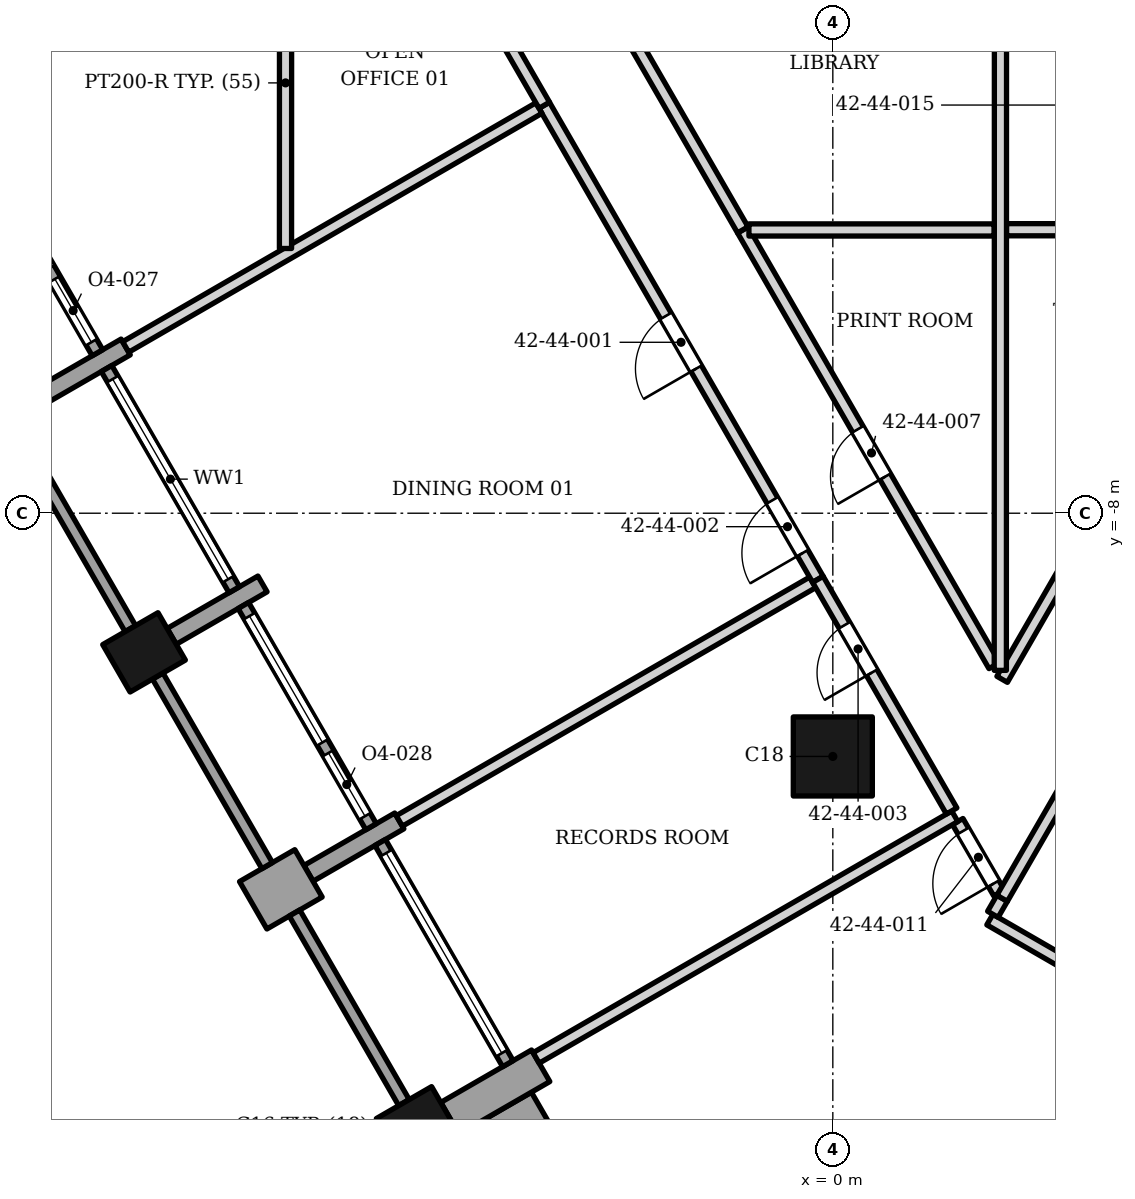
"""IFC4 building model, lengths in metres.
Left out: names, types, materials, properties, quantities, classifications, styles, units other than length and angle.
Written with IfcOpenShell. Run it as: python <this file> out.ifc"""

import sys

from ifc_helpers import new_model, si_unit, direction, frame, frame_2d, origin, origin_2d, place, context, subcontext, project, spatial, rectangle, extrude, element, fill, save


model = new_model("IFC4")
c1 = context("Model", 3, precision=1e-05, world=origin(), true_north=direction((0.0, 1.0)))
c2 = subcontext(c1, "Body", "Model", "MODEL_VIEW")
j1 = project(units=[si_unit("LENGTHUNIT", "METRE"), si_unit("PLANEANGLEUNIT", "RADIAN")], contexts=[c1])
p1 = place(None, origin())
s1 = spatial("IfcSite", under=j1, at=p1, CompositionType="ELEMENT")
p2 = place(p1, origin())
s2 = spatial("IfcBuilding", under=s1, at=p2, CompositionType="ELEMENT")
p3 = place(p2, frame((0.0, 0.0, 179.7)))
s3 = spatial("IfcBuildingStorey", under=s2, at=p3, CompositionType="ELEMENT", Elevation=179.7)
p4 = place(p3, frame((0.0, -12.0, 0.0), z_axis=(0.0, 0.0, 1.0), x_axis=(1.0, 0.0, 0.0)))
e1 = element("IfcColumn", 1, at=p4, inside=s3, PredefinedType="COLUMN", context=c2, shape_type="SweptSolid", body=[
    extrude(rectangle(XDim=1.3, YDim=1.3, at=origin_2d()), origin(), (0.0, 0.0, 1.0), 3.9),
])
for number, where, z_axis, x_axis in (
    (2, (-11.328, -10.288, 0.0), (0.0, 0.0, 1.0), (0.5, -0.866, 0.0)),
    (3, (-6.828, -18.082, 0.0), (0.0, 0.0, 1.0), (0.5, -0.866, 0.0)),
):
    element("IfcColumn", number, at=place(p3, frame(where, z_axis=z_axis, x_axis=x_axis)), inside=s3, PredefinedType="COLUMN", context=c2, shape_type="SweptSolid", body=[
        extrude(rectangle(XDim=0.9, YDim=1.05, at=origin_2d()), origin(), (0.0, 0.0, 1.0), 3.9),
    ])
p5 = place(p3, frame((-11.629, -5.266, 0.0), z_axis=(0.0, 0.0, 1.0), x_axis=(-0.866013532718, -0.500020560727, 0.0)))
e4 = element("IfcWall", 4, at=p5, inside=s3, PredefinedType="SOLIDWALL", context=c2, shape_type="SweptSolid", body=[
    extrude(rectangle(XDim=1.725, YDim=0.3, at=frame_2d((0.863, 0.0))), origin(), (0.0, 0.0, 1.0), 3.0),
])
p6 = place(p3, frame((-9.379, -9.163, 0.0), z_axis=(0.0, 0.0, 1.0), x_axis=(-0.866074815912, -0.499914405916, 0.0)))
e5 = element("IfcWall", 5, at=p6, inside=s3, PredefinedType="SOLIDWALL", context=c2, shape_type="SweptSolid", body=[
    extrude(rectangle(XDim=1.725, YDim=0.3, at=frame_2d((0.862, 0.0))), origin(), (0.0, 0.0, 1.0), 3.0),
])
p7 = place(p3, frame((-8.623, -13.923, 0.0), z_axis=(0.0, 0.0, 1.0), x_axis=(-0.866088799389, -0.499890179513, 0.0)))
e6 = element("IfcWall", 6, at=p7, inside=s3, PredefinedType="SOLIDWALL", context=c2, shape_type="SweptSolid", body=[
    extrude(rectangle(XDim=1.05, YDim=0.9, at=frame_2d((0.525, 0.0))), origin(), (0.0, 0.0, 1.0), 3.0),
])
p8 = place(p3, frame((-8.623, -13.923, 0.0), z_axis=(0.0, 0.0, 1.0), x_axis=(0.866013532718, 0.500020560727, 0.0)))
e7 = element("IfcWall", 7, at=p8, inside=s3, PredefinedType="SOLIDWALL", context=c2, shape_type="SweptSolid", body=[
    extrude(rectangle(XDim=1.725, YDim=0.3, at=frame_2d((0.863, 0.0))), origin(), (0.0, 0.0, 1.0), 3.0),
])
p9 = place(p3, frame((-4.804, -17.087, 0.0), z_axis=(0.0, 0.0, 1.0), x_axis=(-0.866013532718, -0.500020560727, 0.0)))
e8 = element("IfcWall", 8, at=p9, inside=s3, PredefinedType="SOLIDWALL", context=c2, shape_type="SweptSolid", body=[
    extrude(rectangle(XDim=1.725, YDim=0.6, at=frame_2d((0.863, 0.0))), origin(), (0.0, 0.0, 1.0), 3.0),
])
p10 = place(p3, frame((-14.194, -1.724, 0.0), z_axis=(0.0, 0.0, 1.0), x_axis=(0.499958946799, -0.866049104564, 0.0)))
e9 = element("IfcWall", 9, at=p10, inside=s3, PredefinedType="ELEMENTEDWALL", context=c2, shape_type="SweptSolid", body=[
    extrude(rectangle(XDim=4.2, YDim=0.2, at=frame_2d((2.1, 0.0))), origin(), (0.0, 0.0, 1.0), 3.0),
])
p11 = place(p10, frame((0.2, 0.0, 0.45)))
e10 = element("IfcOpeningElement", 10, at=p11, cuts=e9, PredefinedType="OPENING", context=c2, shape_type="SweptSolid", body=[
    extrude(rectangle(XDim=2.4, YDim=2.25, at=frame_2d((1.2, 1.125))), frame((0.0, 0.11, 0.0), z_axis=(0.0, -1.0, 0.0), x_axis=(1.0, 0.0, 0.0)), (0.0, 0.0, 1.0), 0.22),
])
p12 = place(p10, frame((2.8, 0.0, 0.0)))
e11 = element("IfcOpeningElement", 11, at=p12, cuts=e9, PredefinedType="OPENING", context=c2, shape_type="SweptSolid", body=[
    extrude(rectangle(XDim=1.2, YDim=2.7, at=frame_2d((0.6, 1.35))), frame((0.0, 0.11, 0.0), z_axis=(0.0, -1.0, 0.0), x_axis=(1.0, 0.0, 0.0)), (0.0, 0.0, 1.0), 0.22),
])
p13 = place(p3, frame((-13.353, -6.781, 0.0), z_axis=(0.0, 0.0, 1.0), x_axis=(0.500012057535, -0.866018442252, 0.0)))
e12 = element("IfcWall", 12, at=p13, inside=s3, PredefinedType="SOLIDWALL", context=c2, shape_type="SweptSolid", body=[
    extrude(rectangle(XDim=3.6, YDim=0.2, at=frame_2d((1.8, 0.0))), origin(), (0.0, 0.0, 1.0), 3.0),
])
p14 = place(p3, frame((-11.944, -5.621, 0.0), z_axis=(0.0, 0.0, 1.0), x_axis=(0.49998411664, -0.866034573852, 0.0)))
e13 = element("IfcWall", 13, at=p14, inside=s3, PredefinedType="ELEMENTEDWALL", context=c2, shape_type="SweptSolid", body=[
    extrude(rectangle(XDim=4.2, YDim=0.2, at=frame_2d((2.1, 0.0))), origin(), (0.0, 0.0, 1.0), 2.884),
])
p15 = place(p14, frame((0.2, 0.0, 0.45)))
e14 = element("IfcOpeningElement", 14, at=p15, cuts=e13, PredefinedType="OPENING", context=c2, shape_type="SweptSolid", body=[
    extrude(rectangle(XDim=3.8, YDim=2.25, at=frame_2d((1.9, 1.125))), frame((0.0, 0.11, 0.0), z_axis=(0.0, -1.0, 0.0), x_axis=(1.0, 0.0, 0.0)), (0.0, 0.0, 1.0), 0.22),
])
p16 = place(p3, frame((-11.103, -10.678, 0.0), z_axis=(0.0, 0.0, 1.0), x_axis=(0.500012057535, -0.866018442252, 0.0)))
e15 = element("IfcWall", 15, at=p16, inside=s3, PredefinedType="SOLIDWALL", context=c2, shape_type="SweptSolid", body=[
    extrude(rectangle(XDim=3.6, YDim=0.2, at=frame_2d((1.8, 0.0))), origin(), (0.0, 0.0, 1.0), 2.95),
])
p17 = place(p3, frame((-9.694, -9.518, 0.0), z_axis=(0.0, 0.0, 1.0), x_axis=(0.499958946799, -0.866049104564, 0.0)))
e16 = element("IfcWall", 16, at=p17, inside=s3, PredefinedType="ELEMENTEDWALL", context=c2, shape_type="SweptSolid", body=[
    extrude(rectangle(XDim=4.2, YDim=0.2, at=frame_2d((2.1, 0.0))), origin(), (0.0, 0.0, 1.0), 2.884),
])
p18 = place(p17, frame((0.2, 0.0, 0.45)))
e17 = element("IfcOpeningElement", 17, at=p18, cuts=e16, PredefinedType="OPENING", context=c2, shape_type="SweptSolid", body=[
    extrude(rectangle(XDim=2.4, YDim=2.25, at=frame_2d((1.2, 1.125))), frame((0.0, 0.11, 0.0), z_axis=(0.0, -1.0, 0.0), x_axis=(1.0, 0.0, 0.0)), (0.0, 0.0, 1.0), 0.22),
])
p19 = place(p17, frame((2.8, 0.0, 0.0)))
e18 = element("IfcOpeningElement", 18, at=p19, cuts=e16, PredefinedType="OPENING", context=c2, shape_type="SweptSolid", body=[
    extrude(rectangle(XDim=1.2, YDim=2.7, at=frame_2d((0.6, 1.35))), frame((0.0, 0.11, 0.0), z_axis=(0.0, -1.0, 0.0), x_axis=(1.0, 0.0, 0.0)), (0.0, 0.0, 1.0), 0.22),
])
p20 = place(p3, frame((-8.853, -14.575, 0.0), z_axis=(0.0, 0.0, 1.0), x_axis=(0.500012057535, -0.866018442252, 0.0)))
e19 = element("IfcWall", 19, at=p20, inside=s3, PredefinedType="SOLIDWALL", context=c2, shape_type="SweptSolid", body=[
    extrude(rectangle(XDim=3.6, YDim=0.2, at=frame_2d((1.8, 0.0))), origin(), (0.0, 0.0, 1.0), 3.0),
])
p21 = place(p3, frame((-7.444, -13.415, 0.0), z_axis=(0.0, 0.0, 1.0), x_axis=(0.49998411664, -0.866034573852, 0.0)))
e20 = element("IfcWall", 20, at=p21, inside=s3, PredefinedType="ELEMENTEDWALL", context=c2, shape_type="SweptSolid", body=[
    extrude(rectangle(XDim=4.2, YDim=0.2, at=frame_2d((2.1, 0.0))), origin(), (0.0, 0.0, 1.0), 3.0),
])
p22 = place(p21, frame((0.2, 0.0, 0.45)))
e21 = element("IfcOpeningElement", 21, at=p22, cuts=e20, PredefinedType="OPENING", context=c2, shape_type="SweptSolid", body=[
    extrude(rectangle(XDim=3.8, YDim=2.25, at=frame_2d((1.9, 1.125))), frame((0.0, 0.11, 0.0), z_axis=(0.0, -1.0, 0.0), x_axis=(1.0, 0.0, 0.0)), (0.0, 0.0, 1.0), 0.22),
])
p23 = place(p3, frame((-6.845, -19.102, 0.0), z_axis=(0.0, 0.0, 1.0), x_axis=(0.866041403502, 0.499972286653, 0.0)))
e22 = element("IfcWall", 22, at=p23, inside=s3, PredefinedType="SOLIDWALL", context=c2, shape_type="SweptSolid", body=[
    extrude(rectangle(XDim=2.425, YDim=0.85, at=frame_2d((1.212, 0.0))), origin(), (0.0, 0.0, 1.0), 3.0),
])
p24 = place(p3, frame((2.583, -14.683, 0.0), z_axis=(0.0, 0.0, 1.0), x_axis=(0.866012237902, -0.500022803284, 0.0)))
e23 = element("IfcWall", 23, at=p24, inside=s3, PredefinedType="PARTITIONING", context=c2, shape_type="SweptSolid", body=[
    extrude(rectangle(XDim=4.55, YDim=0.2, at=frame_2d((2.275, 0.0))), origin(), (0.0, 0.0, 1.0), 2.884),
])
p25 = place(p3, frame((2.632, -14.596, 0.0), z_axis=(0.0, 0.0, 1.0), x_axis=(0.499074005857, 0.866559367082, 0.0)))
e24 = element("IfcWall", 24, at=p25, inside=s3, PredefinedType="PARTITIONING", context=c2, shape_type="SweptSolid", body=[
    extrude(rectangle(XDim=0.304, YDim=0.2, at=frame_2d((0.152, 0.0))), origin(), (0.0, 0.0, 1.0), 3.73),
])
p26 = place(p3, frame((2.054, -13.07, 0.0), z_axis=(0.0, 0.0, 1.0), x_axis=(0.500759821175, -0.865586276172, 0.0)))
e25 = element("IfcWall", 25, at=p26, inside=s3, PredefinedType="PARTITIONING", context=c2, shape_type="SweptSolid", body=[
    extrude(rectangle(XDim=1.358, YDim=0.2, at=frame_2d((0.679, 0.0))), origin(), (0.0, 0.0, 1.0), 2.884),
])
p27 = place(p26, frame((0.179, 0.0, 0.0)))
e26 = element("IfcOpeningElement", 26, at=p27, cuts=e25, PredefinedType="OPENING", context=c2, shape_type="SweptSolid", body=[
    extrude(rectangle(XDim=1.0, YDim=2.1, at=frame_2d((0.5, 1.05))), frame((0.0, 0.11, 0.0), z_axis=(0.0, -1.0, 0.0), x_axis=(1.0, 0.0, 0.0)), (0.0, 0.0, 1.0), 0.22),
])
p28 = place(p3, frame((-7.129, -13.06, 0.0), z_axis=(0.0, 0.0, 1.0), x_axis=(0.866135346495, 0.499809525271, 0.0)))
e27 = element("IfcWall", 27, at=p28, inside=s3, PredefinedType="PARTITIONING", context=c2, shape_type="SweptSolid", body=[
    extrude(rectangle(XDim=7.848, YDim=0.2, at=frame_2d((3.924, 0.0))), origin(), (0.0, 0.0, 1.0), 2.742),
])
p29 = place(p3, frame((-4.879, -16.958, 0.0), z_axis=(0.0, 0.0, 1.0), x_axis=(0.866110929286, 0.499851836219, 0.0)))
e28 = element("IfcWall", 28, at=p29, inside=s3, PredefinedType="PARTITIONING", context=c2, shape_type="SweptSolid", body=[
    extrude(rectangle(XDim=7.95, YDim=0.2, at=frame_2d((3.975, 0.0))), origin(), (0.0, 0.0, 1.0), 2.884),
])
p30 = place(p3, frame((2.785, -10.732, 0.0), z_axis=(0.0, 0.0, 1.0), x_axis=(0.499820110187, 0.866129238309, 0.0)))
e29 = element("IfcWall", 29, at=p30, inside=s3, PredefinedType="PARTITIONING", context=c2, shape_type="SweptSolid", body=[
    extrude(rectangle(XDim=16.664, YDim=0.2, at=frame_2d((8.332, 0.0))), origin(), (0.0, 0.0, 1.0), 2.742),
])
p31 = place(p30, frame((3.818, 0.0, 0.0)))
e30 = element("IfcOpeningElement", 30, at=p31, cuts=e29, PredefinedType="OPENING", context=c2, shape_type="SweptSolid", body=[
    extrude(rectangle(XDim=0.9, YDim=2.1, at=frame_2d((0.45, 1.05))), frame((0.0, 0.11, 0.0), z_axis=(0.0, -1.0, 0.0), x_axis=(1.0, 0.0, 0.0)), (0.0, 0.0, 1.0), 0.22),
])
p32 = place(p30, frame((12.1, 0.0, 0.0)))
e31 = element("IfcOpeningElement", 31, at=p32, cuts=e29, PredefinedType="OPENING", context=c2, shape_type="SweptSolid", body=[
    extrude(rectangle(XDim=1.0, YDim=2.1, at=frame_2d((0.5, 1.05))), frame((0.0, 0.11, 0.0), z_axis=(0.0, -1.0, 0.0), x_axis=(1.0, 0.0, 0.0)), (0.0, 0.0, 1.0), 0.22),
])
p33 = place(p3, frame((-4.746, -1.292, 0.0), z_axis=(0.0, 0.0, 1.0), x_axis=(0.5000018851, -0.866024315419, 0.0)))
e32 = element("IfcWall", 32, at=p33, inside=s3, PredefinedType="PARTITIONING", context=c2, shape_type="SweptSolid", body=[
    extrude(rectangle(XDim=9.0, YDim=0.2, at=frame_2d((4.5, 0.0))), origin(), (0.0, 0.0, 1.0), 2.742),
])
p34 = place(p33, frame((4.0, 0.0, 0.0)))
e33 = element("IfcOpeningElement", 33, at=p34, cuts=e32, PredefinedType="OPENING", context=c2, shape_type="SweptSolid", body=[
    extrude(rectangle(XDim=1.0, YDim=2.1, at=frame_2d((0.5, 1.05))), frame((0.0, 0.11, 0.0), z_axis=(0.0, -1.0, 0.0), x_axis=(1.0, 0.0, 0.0)), (0.0, 0.0, 1.0), 0.22),
])
p35 = place(p33, frame((7.502, 0.0, 0.0)))
e34 = element("IfcOpeningElement", 34, at=p35, cuts=e32, PredefinedType="OPENING", context=c2, shape_type="SweptSolid", body=[
    extrude(rectangle(XDim=1.0, YDim=2.1, at=frame_2d((0.5, 1.05))), frame((0.0, 0.11, 0.0), z_axis=(0.0, -1.0, 0.0), x_axis=(1.0, 0.0, 0.0)), (0.0, 0.0, 1.0), 0.22),
])
p36 = place(p3, frame((-0.245, -9.088, 0.0), z_axis=(0.0, 0.0, 1.0), x_axis=(0.500013981145, -0.866017331616, 0.0)))
e35 = element("IfcWall", 35, at=p36, inside=s3, PredefinedType="PARTITIONING", context=c2, shape_type="SweptSolid", body=[
    extrude(rectangle(XDim=4.398, YDim=0.2, at=frame_2d((2.199, 0.0))), origin(), (0.0, 0.0, 1.0), 2.742),
])
p37 = place(p36, frame((0.871, 0.0, 0.0)))
e36 = element("IfcOpeningElement", 36, at=p37, cuts=e35, PredefinedType="OPENING", context=c2, shape_type="SweptSolid", body=[
    extrude(rectangle(XDim=0.9, YDim=2.1, at=frame_2d((0.45, 1.05))), frame((0.0, 0.11, 0.0), z_axis=(0.0, -1.0, 0.0), x_axis=(1.0, 0.0, 0.0)), (0.0, 0.0, 1.0), 0.22),
])
p38 = place(p3, frame((2.784, -14.333, 0.0), z_axis=(0.0, 0.0, 1.0), x_axis=(0.500204257301, 0.865907443656, 0.0)))
e37 = element("IfcWall", 37, at=p38, inside=s3, PredefinedType="PARTITIONING", context=c2, shape_type="SweptSolid", body=[
    extrude(rectangle(XDim=8.597, YDim=0.2, at=frame_2d((4.298, 0.0))), origin(), (0.0, 0.0, 1.0), 2.742),
])
p39 = place(p38, frame((3.799, 0.0, 0.0)))
e38 = element("IfcOpeningElement", 38, at=p39, cuts=e37, PredefinedType="OPENING", context=c2, shape_type="SweptSolid", body=[
    extrude(rectangle(XDim=1.0, YDim=2.4, at=frame_2d((0.5, 1.2))), frame((0.0, 0.11, 0.0), z_axis=(0.0, -1.0, 0.0), x_axis=(1.0, 0.0, 0.0)), (0.0, 0.0, 1.0), 0.22),
])
p40 = place(p3, frame((-11.63, -5.265, 0.0), z_axis=(0.0, 0.0, 1.0), x_axis=(0.865784523432, 0.500416985109, 0.0)))
e39 = element("IfcWall", 39, at=p40, inside=s3, PredefinedType="PARTITIONING", context=c2, shape_type="SweptSolid", body=[
    extrude(rectangle(XDim=7.849, YDim=0.2, at=frame_2d((3.925, 0.0))), origin(), (0.0, 0.0, 1.0), 2.742),
])
p41 = place(p3, frame((-9.002, -3.646, 0.0), z_axis=(0.0, 0.0, 1.0), x_axis=(0.000268949741, 0.999999963833, 0.0)))
e40 = element("IfcWall", 40, at=p41, inside=s3, PredefinedType="PARTITIONING", context=c2, shape_type="SweptSolid", body=[
    extrude(rectangle(XDim=5.447, YDim=0.2, at=frame_2d((2.723, 0.0))), origin(), (0.0, 0.0, 1.0), 2.884),
])
p42 = place(p3, frame((-1.48, -3.342, 0.0), z_axis=(0.0, 0.0, 1.0), x_axis=(0.499828066166, -0.866124647076, 0.0)))
e41 = element("IfcWall", 41, at=p42, inside=s3, PredefinedType="PARTITIONING", context=c2, shape_type="SweptSolid", body=[
    extrude(rectangle(XDim=8.271, YDim=0.2, at=frame_2d((4.136, 0.0))), origin(), (0.0, 0.0, 1.0), 2.742),
])
p43 = place(p42, frame((3.784, 0.0, 0.0)))
e42 = element("IfcOpeningElement", 42, at=p43, cuts=e41, PredefinedType="OPENING", context=c2, shape_type="SweptSolid", body=[
    extrude(rectangle(XDim=0.9, YDim=2.1, at=frame_2d((0.45, 1.05))), frame((0.0, 0.11, 0.0), z_axis=(0.0, -1.0, 0.0), x_axis=(1.0, 0.0, 0.0)), (0.0, 0.0, 1.0), 0.22),
])
p44 = place(p3, frame((-1.38, -3.342, 0.0), z_axis=(0.0, 0.0, 1.0), x_axis=(1.0, 0.0, 0.0)))
e43 = element("IfcWall", 43, at=p44, inside=s3, PredefinedType="PARTITIONING", context=c2, shape_type="SweptSolid", body=[
    extrude(rectangle(XDim=4.034, YDim=0.2, at=frame_2d((2.017, 0.0))), origin(), (0.0, 0.0, 1.0), 2.742),
])
p45 = place(p3, frame((2.856, -3.338, 0.0), z_axis=(0.0, 0.0, 1.0), x_axis=(1.0, 0.0, 0.0)))
e44 = element("IfcWall", 44, at=p45, inside=s3, PredefinedType="PARTITIONING", context=c2, shape_type="SweptSolid", body=[
    extrude(rectangle(XDim=1.954, YDim=0.2, at=frame_2d((0.977, 0.0))), origin(), (0.0, 0.0, 1.0), 2.742),
])
p46 = place(p3, frame((-7.626, 3.699, 0.0), z_axis=(0.0, 0.0, 1.0), x_axis=(0.499998744741, -0.866026128507, 0.0)))
e45 = element("IfcWall", 45, at=p46, inside=s3, PredefinedType="PARTITIONING", context=c2, shape_type="SweptSolid", body=[
    extrude(rectangle(XDim=5.762, YDim=0.2, at=frame_2d((2.881, 0.0))), origin(), (0.0, 0.0, 1.0), 2.742),
])
p47 = place(p46, frame((2.381, 0.0, 0.0)))
e46 = element("IfcOpeningElement", 46, at=p47, cuts=e45, PredefinedType="OPENING", context=c2, shape_type="SweptSolid", body=[
    extrude(rectangle(XDim=1.0, YDim=2.1, at=frame_2d((0.5, 1.05))), frame((0.0, 0.11, 0.0), z_axis=(0.0, -1.0, 0.0), x_axis=(1.0, 0.0, 0.0)), (0.0, 0.0, 1.0), 0.22),
])
p48 = place(p3, frame((2.754, -10.584, 0.0), z_axis=(0.0, 0.0, 1.0), x_axis=(0.00025119316, 0.999999968451, 0.0)))
e47 = element("IfcWall", 47, at=p48, inside=s3, PredefinedType="PARTITIONING", context=c2, shape_type="SweptSolid", body=[
    extrude(rectangle(XDim=12.635, YDim=0.2, at=frame_2d((6.317, 0.0))), origin(), (0.0, 0.0, 1.0), 3.73),
])
p49 = place(p3, frame((-5.608, 3.806, 0.0), z_axis=(0.0, 0.0, 1.0), x_axis=(0.500189366784, -0.865916045212, 0.0)))
e48 = element("IfcWall", 48, at=p49, inside=s3, PredefinedType="PARTITIONING", context=c2, shape_type="SweptSolid", body=[
    extrude(rectangle(XDim=8.252, YDim=0.2, at=frame_2d((4.126, 0.0))), origin(), (0.0, 0.0, 1.0), 2.742),
])
p50 = place(p49, frame((3.625, 0.0, 0.0)))
e49 = element("IfcOpeningElement", 49, at=p50, cuts=e48, PredefinedType="OPENING", context=c2, shape_type="SweptSolid", body=[
    extrude(rectangle(XDim=1.0, YDim=2.4, at=frame_2d((0.5, 1.2))), frame((0.0, 0.11, 0.0), z_axis=(0.0, -1.0, 0.0), x_axis=(1.0, 0.0, 0.0)), (0.0, 0.0, 1.0), 0.22),
])
p51 = place(p12, origin())
e50 = element("IfcDoor", 50, at=p51, inside=s3, OperationType="SINGLE_SWING_LEFT", PredefinedType="DOOR", context=c2, shape_type="SweptSolid", body=[
    extrude(rectangle(XDim=1.2, YDim=2.7, at=frame_2d((0.6, 1.35))), frame((0.0, 0.025, 0.0), z_axis=(0.0, -1.0, 0.0), x_axis=(1.0, 0.0, 0.0)), (0.0, 0.0, 1.0), 0.05),
])
fill(e11, e50)
p52 = place(p15, origin())
e51 = element("IfcWindow", 51, at=p52, inside=s3, PartitioningType="SINGLE_PANEL", PredefinedType="WINDOW", context=c2, shape_type="SweptSolid", body=[
    extrude(rectangle(XDim=3.8, YDim=2.25, at=frame_2d((1.9, 1.125))), frame((0.0, 0.03, 0.0), z_axis=(0.0, -1.0, 0.0), x_axis=(1.0, 0.0, 0.0)), (0.0, 0.0, 1.0), 0.06),
])
fill(e14, e51)
p53 = place(p18, origin())
e52 = element("IfcWindow", 52, at=p53, inside=s3, PartitioningType="SINGLE_PANEL", PredefinedType="WINDOW", context=c2, shape_type="SweptSolid", body=[
    extrude(rectangle(XDim=2.4, YDim=2.25, at=frame_2d((1.2, 1.125))), frame((0.0, 0.03, 0.0), z_axis=(0.0, -1.0, 0.0), x_axis=(1.0, 0.0, 0.0)), (0.0, 0.0, 1.0), 0.06),
])
fill(e17, e52)
p54 = place(p19, origin())
e53 = element("IfcDoor", 53, at=p54, inside=s3, OperationType="SINGLE_SWING_LEFT", PredefinedType="DOOR", context=c2, shape_type="SweptSolid", body=[
    extrude(rectangle(XDim=1.2, YDim=2.7, at=frame_2d((0.6, 1.35))), frame((0.0, 0.025, 0.0), z_axis=(0.0, -1.0, 0.0), x_axis=(1.0, 0.0, 0.0)), (0.0, 0.0, 1.0), 0.05),
])
fill(e18, e53)
p55 = place(p22, origin())
e54 = element("IfcWindow", 54, at=p55, inside=s3, PartitioningType="SINGLE_PANEL", PredefinedType="WINDOW", context=c2, shape_type="SweptSolid", body=[
    extrude(rectangle(XDim=3.8, YDim=2.25, at=frame_2d((1.9, 1.125))), frame((0.0, 0.03, 0.0), z_axis=(0.0, -1.0, 0.0), x_axis=(1.0, 0.0, 0.0)), (0.0, 0.0, 1.0), 0.06),
])
fill(e21, e54)
p56 = place(p34, origin())
e55 = element("IfcDoor", 55, at=p56, inside=s3, OperationType="SINGLE_SWING_RIGHT", PredefinedType="DOOR", context=c2, shape_type="SweptSolid", body=[
    extrude(rectangle(XDim=1.0, YDim=2.1, at=frame_2d((0.5, 1.05))), frame((0.0, 0.025, 0.0), z_axis=(0.0, -1.0, 0.0), x_axis=(1.0, 0.0, 0.0)), (0.0, 0.0, 1.0), 0.05),
])
fill(e33, e55)
p57 = place(p35, origin())
e56 = element("IfcDoor", 56, at=p57, inside=s3, OperationType="SINGLE_SWING_RIGHT", PredefinedType="DOOR", context=c2, shape_type="SweptSolid", body=[
    extrude(rectangle(XDim=1.0, YDim=2.1, at=frame_2d((0.5, 1.05))), frame((0.0, 0.025, 0.0), z_axis=(0.0, -1.0, 0.0), x_axis=(1.0, 0.0, 0.0)), (0.0, 0.0, 1.0), 0.05),
])
fill(e34, e56)
p58 = place(p37, origin())
e57 = element("IfcDoor", 57, at=p58, inside=s3, OperationType="SINGLE_SWING_RIGHT", PredefinedType="DOOR", context=c2, shape_type="SweptSolid", body=[
    extrude(rectangle(XDim=0.9, YDim=2.1, at=frame_2d((0.45, 1.05))), frame((0.0, 0.025, 0.0), z_axis=(0.0, -1.0, 0.0), x_axis=(1.0, 0.0, 0.0)), (0.0, 0.0, 1.0), 0.05),
])
fill(e36, e57)
p59 = place(p43, origin())
e58 = element("IfcDoor", 58, at=p59, inside=s3, OperationType="SINGLE_SWING_RIGHT", PredefinedType="DOOR", context=c2, shape_type="SweptSolid", body=[
    extrude(rectangle(XDim=0.9, YDim=2.1, at=frame_2d((0.45, 1.05))), frame((0.0, 0.025, 0.0), z_axis=(0.0, -1.0, 0.0), x_axis=(1.0, 0.0, 0.0)), (0.0, 0.0, 1.0), 0.05),
])
fill(e42, e58)
p60 = place(p27, origin())
e59 = element("IfcDoor", 59, at=p60, inside=s3, OperationType="SINGLE_SWING_RIGHT", PredefinedType="DOOR", context=c2, shape_type="SweptSolid", body=[
    extrude(rectangle(XDim=1.0, YDim=2.1, at=frame_2d((0.5, 1.05))), frame((0.0, 0.025, 0.0), z_axis=(0.0, -1.0, 0.0), x_axis=(1.0, 0.0, 0.0)), (0.0, 0.0, 1.0), 0.05),
])
fill(e26, e59)
save(model, sys.argv[1])
